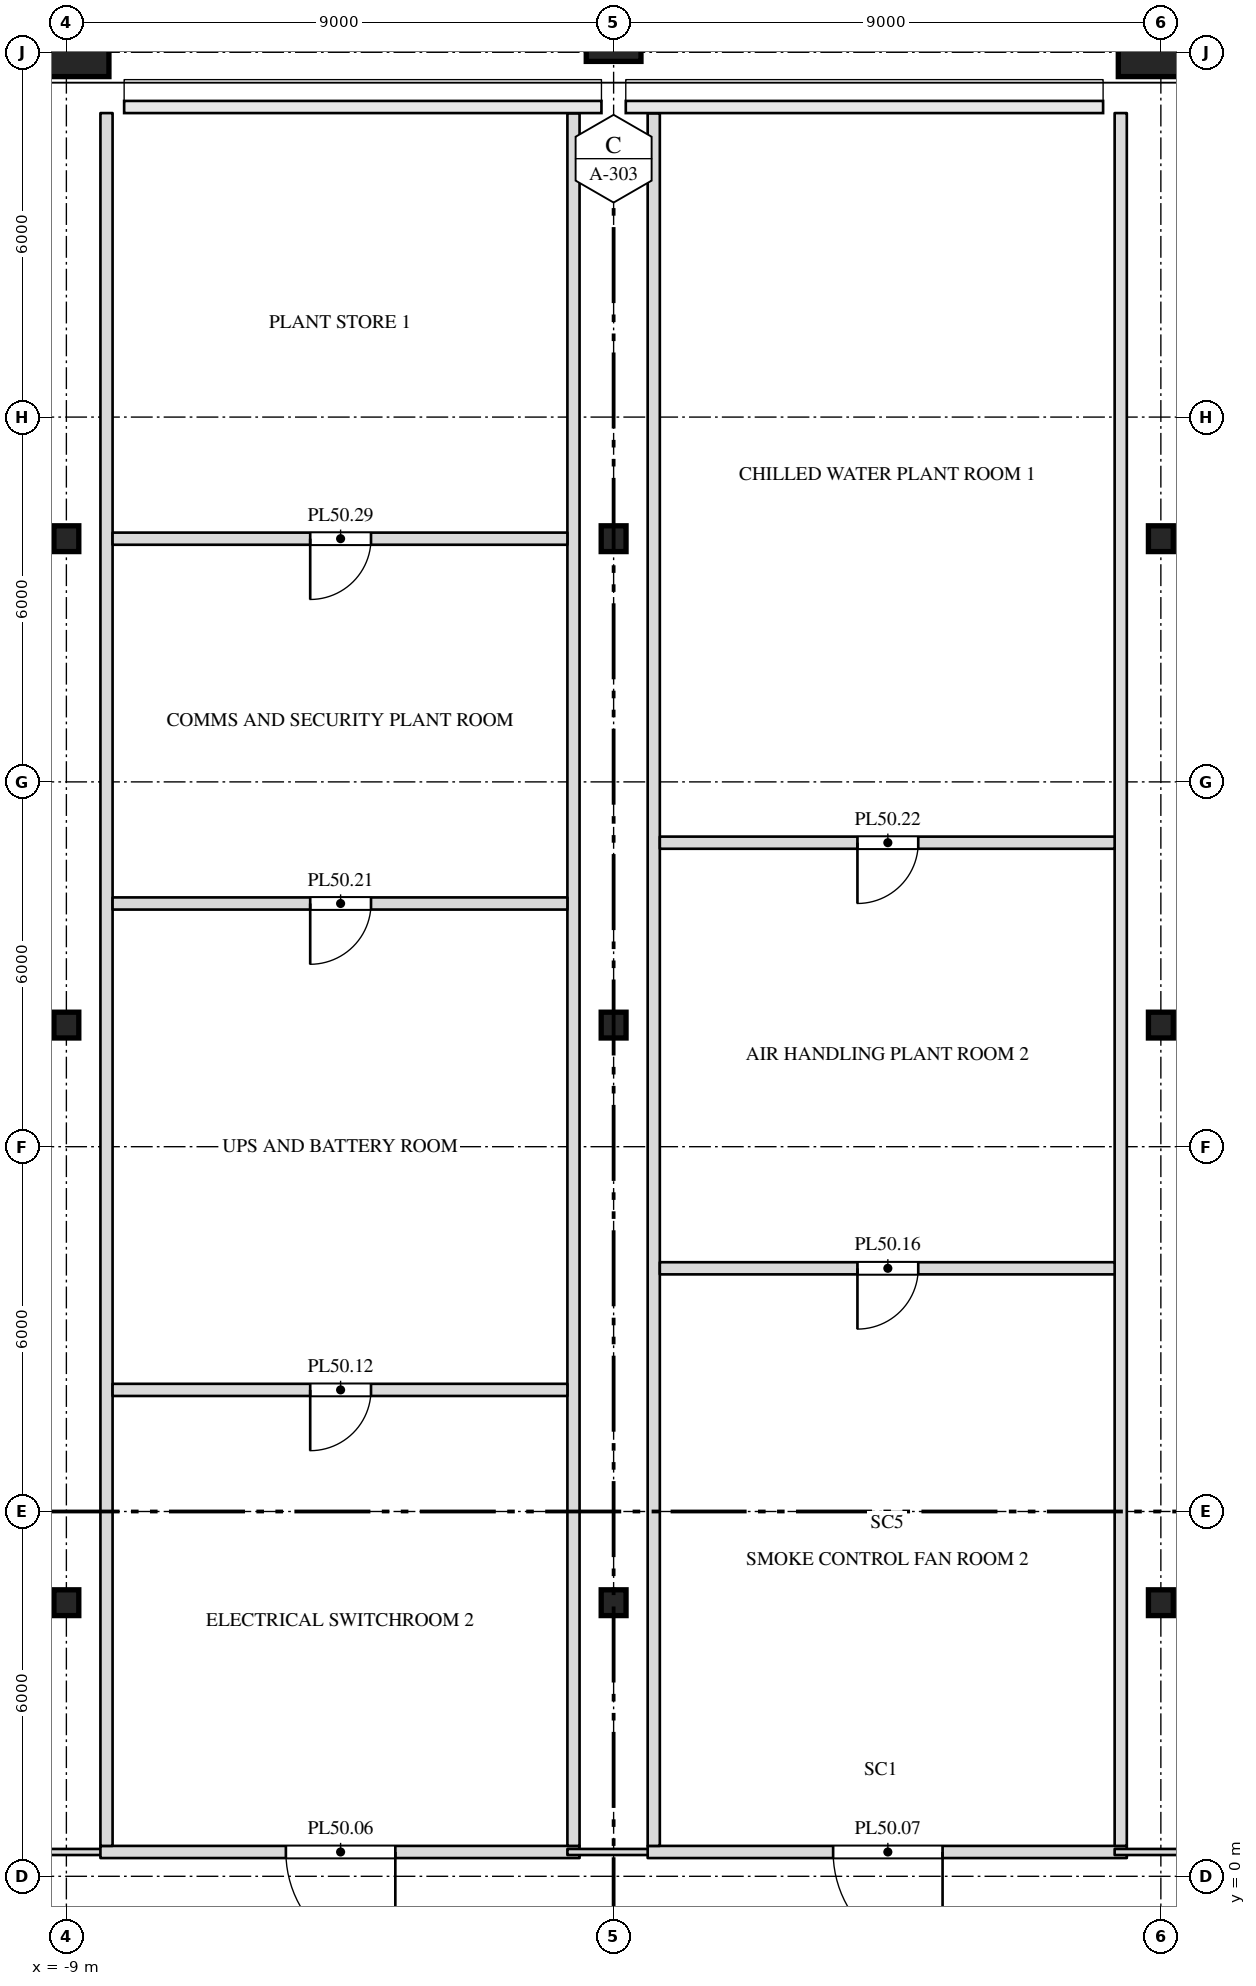
"""IFC4 building model, lengths in metres.
Left out: names, types, materials, properties, quantities, classifications, styles, units other than length and angle.
Written with IfcOpenShell. Run it as: python <this file> out.ifc"""

import sys

from ifc_helpers import new_model, si_unit, direction, frame, frame_2d, origin, origin_2d, place, context, subcontext, project, spatial, rectangle, i_section, extrude, clip, halfspace, element, fill, save


model = new_model("IFC4")
c1 = context("Model", 3, precision=1e-05, world=origin(), true_north=direction((0.0, 1.0)))
c2 = subcontext(c1, "Body", "Model", "MODEL_VIEW")
j1 = project(units=[si_unit("LENGTHUNIT", "METRE"), si_unit("PLANEANGLEUNIT", "RADIAN")], contexts=[c1])
p1 = place(None, origin())
s1 = spatial("IfcSite", under=j1, at=p1, CompositionType="ELEMENT")
p2 = place(p1, origin())
s2 = spatial("IfcBuilding", under=s1, at=p2, CompositionType="ELEMENT")
p3 = place(p2, frame((0.0, 0.0, 216.5)))
s3 = spatial("IfcBuildingStorey", under=s2, at=p3, CompositionType="ELEMENT", Elevation=216.5)
for number, where, z_axis, x_axis in (
    (1, (-9.0, 4.5, 0.0), (0.0, 0.0, 1.0), (1.0, 0.0, 0.0)),
    (2, (0.0, 4.5, 0.0), (0.0, 0.0, 1.0), (1.0, 0.0, 0.0)),
    (3, (9.0, 4.5, 0.0), (0.0, 0.0, 1.0), (1.0, 0.0, 0.0)),
    (4, (-9.0, 14.0, 0.0), (0.0, 0.0, 1.0), (1.0, 0.0, 0.0)),
    (5, (0.0, 14.0, 0.0), (0.0, 0.0, 1.0), (1.0, 0.0, 0.0)),
    (6, (9.0, 14.0, 0.0), (0.0, 0.0, 1.0), (1.0, 0.0, 0.0)),
    (7, (-9.0, 22.0, 0.0), (0.0, 0.0, 1.0), (1.0, 0.0, 0.0)),
    (8, (0.0, 22.0, 0.0), (0.0, 0.0, 1.0), (1.0, 0.0, 0.0)),
    (9, (9.0, 22.0, 0.0), (0.0, 0.0, 1.0), (1.0, 0.0, 0.0)),
):
    element("IfcColumn", number, at=place(p3, frame(where, z_axis=z_axis, x_axis=x_axis)), inside=s3, PredefinedType="COLUMN", context=c2, shape_type="SweptSolid", body=[
        extrude(i_section(OverallWidth=0.409, OverallDepth=0.424, WebThickness=0.033, FlangeThickness=0.052, at=origin_2d()), origin(), (0.0, 0.0, 1.0), 4.0),
    ])
p4 = place(p3, frame((-9.0, 30.0, 0.0), z_axis=(0.0, 0.242535625036, 0.970142500145), x_axis=(-1.0, 0.0, 0.0)))
e10 = element("IfcColumn", 10, at=p4, inside=s3, PredefinedType="COLUMN", context=c2, shape_type="Clipping", body=[
    clip(extrude(rectangle(XDim=1.4, YDim=1.4, at=origin_2d()), origin(), (0.0, 0.0, 1.0), 4.123), halfspace(frame((0.0, 0.0, 3.948)), False)),
])
p5 = place(p3, frame((0.0, 30.0, 0.0), z_axis=(0.0, 0.242535625036, 0.970142500145), x_axis=(-1.0, 0.0, 0.0)))
e11 = element("IfcColumn", 11, at=p5, inside=s3, PredefinedType="COLUMN", context=c2, shape_type="Clipping", body=[
    clip(extrude(rectangle(XDim=0.9, YDim=0.9, at=origin_2d()), origin(), (0.0, 0.0, 1.0), 4.123), halfspace(frame((0.0, 0.0, 4.01)), False)),
])
p6 = place(p3, frame((9.0, 30.0, 0.0), z_axis=(0.0, 0.242535625036, 0.970142500145), x_axis=(-1.0, 0.0, 0.0)))
e12 = element("IfcColumn", 12, at=p6, inside=s3, PredefinedType="COLUMN", context=c2, shape_type="Clipping", body=[
    clip(extrude(rectangle(XDim=1.4, YDim=1.4, at=origin_2d()), origin(), (0.0, 0.0, 1.0), 4.123), halfspace(frame((0.0, 0.0, 3.948)), False)),
])
p7 = place(p3, frame((-9.76, 0.4, 0.0), z_axis=(0.0, 0.0, 1.0), x_axis=(1.0, 0.0, 0.0)))
e13 = element("IfcWall", 13, at=p7, inside=s3, PredefinedType="PARTITIONING", context=c2, shape_type="SweptSolid", body=[
    extrude(rectangle(XDim=1.52, YDim=0.1, at=frame_2d((0.76, 0.0))), origin(), (0.0, 0.0, 1.0), 3.8),
])
p8 = place(p3, frame((-8.44, 0.4, 0.0), z_axis=(0.0, 0.0, 1.0), x_axis=(1.0, 0.0, 0.0)))
e14 = element("IfcWall", 14, at=p8, inside=s3, PredefinedType="PARTITIONING", context=c2, shape_type="SweptSolid", body=[
    extrude(rectangle(XDim=7.88, YDim=0.2, at=frame_2d((3.94, 0.0))), origin(), (0.0, 0.0, 1.0), 3.8),
])
p9 = place(p8, frame((3.05, 0.0, 0.0)))
e15 = element("IfcOpeningElement", 15, at=p9, cuts=e14, PredefinedType="OPENING", context=c2, shape_type="SweptSolid", body=[
    extrude(rectangle(XDim=1.8, YDim=2.1, at=frame_2d((0.9, 1.05))), frame((0.0, 0.112, 0.0), z_axis=(0.0, -1.0, 0.0), x_axis=(1.0, 0.0, 0.0)), (0.0, 0.0, 1.0), 0.224),
])
p10 = place(p3, frame((-8.34, 0.5, 0.0), z_axis=(0.0, 0.0, 1.0), x_axis=(0.0, 1.0, 0.0)))
e16 = element("IfcWall", 16, at=p10, inside=s3, PredefinedType="PARTITIONING", context=c2, shape_type="SweptSolid", body=[
    extrude(rectangle(XDim=28.5, YDim=0.2, at=frame_2d((14.25, 0.0))), origin(), (0.0, 0.0, 1.0), 3.8),
])
p11 = place(p3, frame((-0.76, 0.4, 0.0), z_axis=(0.0, 0.0, 1.0), x_axis=(1.0, 0.0, 0.0)))
e17 = element("IfcWall", 17, at=p11, inside=s3, PredefinedType="PARTITIONING", context=c2, shape_type="SweptSolid", body=[
    extrude(rectangle(XDim=1.52, YDim=0.1, at=frame_2d((0.76, 0.0))), origin(), (0.0, 0.0, 1.0), 3.8),
])
p12 = place(p3, frame((-0.66, 0.5, 0.0), z_axis=(0.0, 0.0, 1.0), x_axis=(0.0, 1.0, 0.0)))
e18 = element("IfcWall", 18, at=p12, inside=s3, PredefinedType="PARTITIONING", context=c2, shape_type="SweptSolid", body=[
    extrude(rectangle(XDim=28.496, YDim=0.2, at=frame_2d((14.248, 0.0))), origin(), (0.0, 0.0, 1.0), 3.8),
])
p13 = place(p3, frame((0.56, 0.4, 0.0), z_axis=(0.0, 0.0, 1.0), x_axis=(1.0, 0.0, 0.0)))
e19 = element("IfcWall", 19, at=p13, inside=s3, PredefinedType="PARTITIONING", context=c2, shape_type="SweptSolid", body=[
    extrude(rectangle(XDim=7.88, YDim=0.2, at=frame_2d((3.94, 0.0))), origin(), (0.0, 0.0, 1.0), 3.8),
])
p14 = place(p13, frame((3.05, 0.0, 0.0)))
e20 = element("IfcOpeningElement", 20, at=p14, cuts=e19, PredefinedType="OPENING", context=c2, shape_type="SweptSolid", body=[
    extrude(rectangle(XDim=1.8, YDim=2.1, at=frame_2d((0.9, 1.05))), frame((0.0, 0.112, 0.0), z_axis=(0.0, -1.0, 0.0), x_axis=(1.0, 0.0, 0.0)), (0.0, 0.0, 1.0), 0.224),
])
p15 = place(p3, frame((0.66, 0.5, 0.0), z_axis=(0.0, 0.0, 1.0), x_axis=(0.0, 1.0, 0.0)))
e21 = element("IfcWall", 21, at=p15, inside=s3, PredefinedType="PARTITIONING", context=c2, shape_type="SweptSolid", body=[
    extrude(rectangle(XDim=28.496, YDim=0.2, at=frame_2d((14.248, 0.0))), origin(), (0.0, 0.0, 1.0), 3.8),
])
p16 = place(p3, frame((8.24, 0.4, 0.0), z_axis=(0.0, 0.0, 1.0), x_axis=(1.0, 0.0, 0.0)))
e22 = element("IfcWall", 22, at=p16, inside=s3, PredefinedType="PARTITIONING", context=c2, shape_type="SweptSolid", body=[
    extrude(rectangle(XDim=1.52, YDim=0.1, at=frame_2d((0.76, 0.0))), origin(), (0.0, 0.0, 1.0), 3.8),
])
p17 = place(p3, frame((8.34, 0.5, 0.0), z_axis=(0.0, 0.0, 1.0), x_axis=(0.0, 1.0, 0.0)))
e23 = element("IfcWall", 23, at=p17, inside=s3, PredefinedType="PARTITIONING", context=c2, shape_type="SweptSolid", body=[
    extrude(rectangle(XDim=28.5, YDim=0.2, at=frame_2d((14.25, 0.0))), origin(), (0.0, 0.0, 1.0), 3.8),
])
p18 = place(p3, frame((-8.24, 8.0, 0.0), z_axis=(0.0, 0.0, 1.0), x_axis=(1.0, 0.0, 0.0)))
e24 = element("IfcWall", 24, at=p18, inside=s3, PredefinedType="PARTITIONING", context=c2, shape_type="SweptSolid", body=[
    extrude(rectangle(XDim=7.48, YDim=0.2, at=frame_2d((3.74, 0.0))), origin(), (0.0, 0.0, 1.0), 3.8),
])
p19 = place(p18, frame((3.25, 0.0, 0.0)))
e25 = element("IfcOpeningElement", 25, at=p19, cuts=e24, PredefinedType="OPENING", context=c2, shape_type="SweptSolid", body=[
    extrude(rectangle(XDim=1.0, YDim=2.1, at=frame_2d((0.5, 1.05))), frame((0.0, 0.112, 0.0), z_axis=(0.0, -1.0, 0.0), x_axis=(1.0, 0.0, 0.0)), (0.0, 0.0, 1.0), 0.224),
])
p20 = place(p3, frame((0.76, 10.0, 0.0), z_axis=(0.0, 0.0, 1.0), x_axis=(1.0, 0.0, 0.0)))
e26 = element("IfcWall", 26, at=p20, inside=s3, PredefinedType="PARTITIONING", context=c2, shape_type="SweptSolid", body=[
    extrude(rectangle(XDim=7.48, YDim=0.2, at=frame_2d((3.74, 0.0))), origin(), (0.0, 0.0, 1.0), 3.8),
])
p21 = place(p20, frame((3.25, 0.0, 0.0)))
e27 = element("IfcOpeningElement", 27, at=p21, cuts=e26, PredefinedType="OPENING", context=c2, shape_type="SweptSolid", body=[
    extrude(rectangle(XDim=1.0, YDim=2.1, at=frame_2d((0.5, 1.05))), frame((0.0, 0.112, 0.0), z_axis=(0.0, -1.0, 0.0), x_axis=(1.0, 0.0, 0.0)), (0.0, 0.0, 1.0), 0.224),
])
p22 = place(p3, frame((-8.24, 16.0, 0.0), z_axis=(0.0, 0.0, 1.0), x_axis=(1.0, 0.0, 0.0)))
e28 = element("IfcWall", 28, at=p22, inside=s3, PredefinedType="PARTITIONING", context=c2, shape_type="SweptSolid", body=[
    extrude(rectangle(XDim=7.48, YDim=0.2, at=frame_2d((3.74, 0.0))), origin(), (0.0, 0.0, 1.0), 3.8),
])
p23 = place(p22, frame((3.25, 0.0, 0.0)))
e29 = element("IfcOpeningElement", 29, at=p23, cuts=e28, PredefinedType="OPENING", context=c2, shape_type="SweptSolid", body=[
    extrude(rectangle(XDim=1.0, YDim=2.1, at=frame_2d((0.5, 1.05))), frame((0.0, 0.112, 0.0), z_axis=(0.0, -1.0, 0.0), x_axis=(1.0, 0.0, 0.0)), (0.0, 0.0, 1.0), 0.224),
])
p24 = place(p3, frame((0.76, 17.0, 0.0), z_axis=(0.0, 0.0, 1.0), x_axis=(1.0, 0.0, 0.0)))
e30 = element("IfcWall", 30, at=p24, inside=s3, PredefinedType="PARTITIONING", context=c2, shape_type="SweptSolid", body=[
    extrude(rectangle(XDim=7.48, YDim=0.2, at=frame_2d((3.74, 0.0))), origin(), (0.0, 0.0, 1.0), 3.8),
])
p25 = place(p24, frame((3.25, 0.0, 0.0)))
e31 = element("IfcOpeningElement", 31, at=p25, cuts=e30, PredefinedType="OPENING", context=c2, shape_type="SweptSolid", body=[
    extrude(rectangle(XDim=1.0, YDim=2.1, at=frame_2d((0.5, 1.05))), frame((0.0, 0.112, 0.0), z_axis=(0.0, -1.0, 0.0), x_axis=(1.0, 0.0, 0.0)), (0.0, 0.0, 1.0), 0.224),
])
p26 = place(p3, frame((-8.24, 22.0, 0.0), z_axis=(0.0, 0.0, 1.0), x_axis=(1.0, 0.0, 0.0)))
e32 = element("IfcWall", 32, at=p26, inside=s3, PredefinedType="PARTITIONING", context=c2, shape_type="SweptSolid", body=[
    extrude(rectangle(XDim=7.48, YDim=0.2, at=frame_2d((3.74, 0.0))), origin(), (0.0, 0.0, 1.0), 2.868),
])
p27 = place(p26, frame((3.25, 0.0, 0.0)))
e33 = element("IfcOpeningElement", 33, at=p27, cuts=e32, PredefinedType="OPENING", context=c2, shape_type="SweptSolid", body=[
    extrude(rectangle(XDim=1.0, YDim=2.1, at=frame_2d((0.5, 1.05))), frame((0.0, 0.112, 0.0), z_axis=(0.0, -1.0, 0.0), x_axis=(1.0, 0.0, 0.0)), (0.0, 0.0, 1.0), 0.224),
])
p28 = place(p9, origin())
e34 = element("IfcDoor", 34, at=p28, inside=s3, OperationType="DOUBLE_DOOR_SINGLE_SWING", PredefinedType="DOOR", context=c2, shape_type="SweptSolid", body=[
    extrude(rectangle(XDim=1.8, YDim=2.1, at=frame_2d((0.9, 1.05))), frame((0.0, 0.025, 0.0), z_axis=(0.0, -1.0, 0.0), x_axis=(1.0, 0.0, 0.0)), (0.0, 0.0, 1.0), 0.05),
])
fill(e15, e34)
p29 = place(p14, origin())
e35 = element("IfcDoor", 35, at=p29, inside=s3, OperationType="DOUBLE_DOOR_SINGLE_SWING", PredefinedType="DOOR", context=c2, shape_type="SweptSolid", body=[
    extrude(rectangle(XDim=1.8, YDim=2.1, at=frame_2d((0.9, 1.05))), frame((0.0, 0.025, 0.0), z_axis=(0.0, -1.0, 0.0), x_axis=(1.0, 0.0, 0.0)), (0.0, 0.0, 1.0), 0.05),
])
fill(e20, e35)
p30 = place(p19, origin())
e36 = element("IfcDoor", 36, at=p30, inside=s3, OperationType="SINGLE_SWING_RIGHT", PredefinedType="DOOR", context=c2, shape_type="SweptSolid", body=[
    extrude(rectangle(XDim=1.0, YDim=2.1, at=frame_2d((0.5, 1.05))), frame((0.0, 0.025, 0.0), z_axis=(0.0, -1.0, 0.0), x_axis=(1.0, 0.0, 0.0)), (0.0, 0.0, 1.0), 0.05),
])
fill(e25, e36)
p31 = place(p21, origin())
e37 = element("IfcDoor", 37, at=p31, inside=s3, OperationType="SINGLE_SWING_RIGHT", PredefinedType="DOOR", context=c2, shape_type="SweptSolid", body=[
    extrude(rectangle(XDim=1.0, YDim=2.1, at=frame_2d((0.5, 1.05))), frame((0.0, 0.025, 0.0), z_axis=(0.0, -1.0, 0.0), x_axis=(1.0, 0.0, 0.0)), (0.0, 0.0, 1.0), 0.05),
])
fill(e27, e37)
p32 = place(p23, origin())
e38 = element("IfcDoor", 38, at=p32, inside=s3, OperationType="SINGLE_SWING_RIGHT", PredefinedType="DOOR", context=c2, shape_type="SweptSolid", body=[
    extrude(rectangle(XDim=1.0, YDim=2.1, at=frame_2d((0.5, 1.05))), frame((0.0, 0.025, 0.0), z_axis=(0.0, -1.0, 0.0), x_axis=(1.0, 0.0, 0.0)), (0.0, 0.0, 1.0), 0.05),
])
fill(e29, e38)
p33 = place(p25, origin())
e39 = element("IfcDoor", 39, at=p33, inside=s3, OperationType="SINGLE_SWING_RIGHT", PredefinedType="DOOR", context=c2, shape_type="SweptSolid", body=[
    extrude(rectangle(XDim=1.0, YDim=2.1, at=frame_2d((0.5, 1.05))), frame((0.0, 0.025, 0.0), z_axis=(0.0, -1.0, 0.0), x_axis=(1.0, 0.0, 0.0)), (0.0, 0.0, 1.0), 0.05),
])
fill(e31, e39)
p34 = place(p27, origin())
e40 = element("IfcDoor", 40, at=p34, inside=s3, OperationType="SINGLE_SWING_RIGHT", PredefinedType="DOOR", context=c2, shape_type="SweptSolid", body=[
    extrude(rectangle(XDim=1.0, YDim=2.1, at=frame_2d((0.5, 1.05))), frame((0.0, 0.025, 0.0), z_axis=(0.0, -1.0, 0.0), x_axis=(1.0, 0.0, 0.0)), (0.0, 0.0, 1.0), 0.05),
])
fill(e33, e40)
save(model, sys.argv[1])
